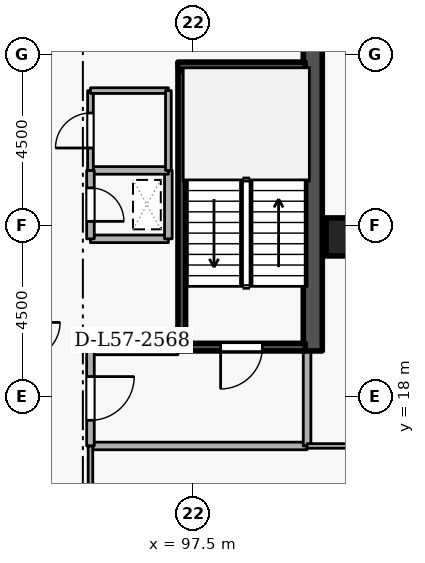
"""IFC4 building model, lengths in metres.
Left out: names, types, materials, properties, quantities, classifications, styles, units other than length and angle.
Written with IfcOpenShell. Run it as: python <this file> out.ifc"""

import sys

from ifc_helpers import new_model, si_unit, direction, frame, frame_2d, origin, origin_2d, place, context, subcontext, project, spatial, rectangle, extrude, element, fill, save


model = new_model("IFC4")
c1 = context("Model", 3, precision=1e-05, world=origin(), true_north=direction((0.0, 1.0)))
c2 = subcontext(c1, "Body", "Model", "MODEL_VIEW")
j1 = project(units=[si_unit("LENGTHUNIT", "METRE"), si_unit("PLANEANGLEUNIT", "RADIAN")], contexts=[c1])
p1 = place(None, origin())
s1 = spatial("IfcSite", under=j1, at=p1, CompositionType="ELEMENT")
p2 = place(p1, origin())
s2 = spatial("IfcBuilding", under=s1, at=p2, CompositionType="ELEMENT")
p3 = place(p2, frame((0.0, 0.0, 214.5)))
s3 = spatial("IfcBuildingStorey", under=s2, at=p3, CompositionType="ELEMENT", Elevation=214.5)
p4 = place(p3, frame((100.65, 19.2, 0.0), z_axis=(0.0, 0.0, 1.0), x_axis=(0.0, 1.0, 0.0)))
e1 = element("IfcWall", 1, at=p4, inside=s3, PredefinedType="SHEAR", context=c2, shape_type="SweptSolid", body=[
    extrude(rectangle(XDim=15.6, YDim=0.5, at=frame_2d((7.8, 0.0))), origin(), (0.0, 0.0, 1.0), 3.6),
])
p5 = place(p3, frame((101.5, 22.2, 0.0), z_axis=(0.0, 0.0, 1.0), x_axis=(1.0, 0.0, 0.0)))
e2 = element("IfcColumn", 2, at=p5, inside=s3, PredefinedType="COLUMN", context=c2, shape_type="SweptSolid", body=[
    extrude(rectangle(XDim=1.0, YDim=1.0, at=origin_2d()), origin(), (0.0, 0.0, 1.0), 3.6),
])
p6 = place(p3, frame((100.45, 19.3, 0.0), z_axis=(0.0, 0.0, 1.0), x_axis=(-1.0, 0.0, 0.0)))
e3 = element("IfcWall", 3, at=p6, inside=s3, PredefinedType="SHEAR", context=c2, shape_type="SweptSolid", body=[
    extrude(rectangle(XDim=3.35, YDim=0.2, at=frame_2d((1.675, 0.0))), origin(), (0.0, 0.0, 1.0), 3.6),
])
p7 = place(p6, frame((1.125, 0.0, 0.0)))
e4 = element("IfcOpeningElement", 4, at=p7, cuts=e3, PredefinedType="OPENING", context=c2, shape_type="SweptSolid", body=[
    extrude(rectangle(XDim=1.1, YDim=2.1, at=frame_2d((0.55, 1.05))), frame((0.0, 0.11, 0.0), z_axis=(0.0, -1.0, 0.0), x_axis=(1.0, 0.0, 0.0)), (0.0, 0.0, 1.0), 0.22),
])
p8 = place(p3, frame((97.1, 26.7, 0.0), z_axis=(0.0, 0.0, 1.0), x_axis=(1.0, 0.0, 0.0)))
e5 = element("IfcWall", 5, at=p8, inside=s3, PredefinedType="SHEAR", context=c2, shape_type="SweptSolid", body=[
    extrude(rectangle(XDim=3.35, YDim=0.2, at=frame_2d((1.675, 0.0))), origin(), (0.0, 0.0, 1.0), 3.6),
])
p9 = place(p3, frame((97.203, 26.55, 0.0), z_axis=(0.0, 0.0, 1.0), x_axis=(0.0, -1.0, 0.0)))
e6 = element("IfcWall", 6, at=p9, inside=s3, PredefinedType="SHEAR", context=c2, shape_type="SweptSolid", body=[
    extrude(rectangle(XDim=7.1, YDim=0.2, at=frame_2d((3.55, 0.0))), origin(), (0.0, 0.0, 1.0), 3.6),
])
p10 = place(p3, frame((94.8, 16.7, 0.0), z_axis=(0.0, 0.0, 1.0), x_axis=(1.0, 0.0, 0.0)))
e7 = element("IfcWall", 7, at=p10, inside=s3, PredefinedType="STANDARD", context=c2, shape_type="SweptSolid", body=[
    extrude(rectangle(XDim=5.7, YDim=0.2, at=frame_2d((2.85, 0.0))), origin(), (0.0, 0.0, 1.0), 3.34),
])
p11 = place(p3, frame((100.5, 16.7, 0.0), z_axis=(0.0, 0.0, 1.0), x_axis=(0.0, 1.0, 0.0)))
e8 = element("IfcWall", 8, at=p11, inside=s3, PredefinedType="STANDARD", context=c2, shape_type="SweptSolid", body=[
    extrude(rectangle(XDim=2.5, YDim=0.2, at=frame_2d((1.25, 0.0))), origin(), (0.0, 0.0, 1.0), 3.34),
])
p12 = place(p3, frame((97.1, 19.2, 0.0), z_axis=(0.0, 0.0, 1.0), x_axis=(-1.0, 0.0, 0.0)))
e9 = element("IfcWall", 9, at=p12, inside=s3, PredefinedType="STANDARD", context=c2, shape_type="SweptSolid", body=[
    extrude(rectangle(XDim=2.3, YDim=0.2, at=frame_2d((1.15, 0.0))), origin(), (0.0, 0.0, 1.0), 2.545),
])
p13 = place(p3, frame((94.8, 19.2, 0.0), z_axis=(0.0, 0.0, 1.0), x_axis=(0.0, -1.0, 0.0)))
e10 = element("IfcWall", 10, at=p13, inside=s3, PredefinedType="STANDARD", context=c2, shape_type="SweptSolid", body=[
    extrude(rectangle(XDim=2.5, YDim=0.2, at=frame_2d((1.25, 0.0))), origin(), (0.0, 0.0, 1.0), 3.34),
])
p14 = place(p13, frame((0.675, 0.0, 0.0)))
e11 = element("IfcOpeningElement", 11, at=p14, cuts=e10, PredefinedType="OPENING", context=c2, shape_type="SweptSolid", body=[
    extrude(rectangle(XDim=1.15, YDim=2.1, at=frame_2d((0.575, 1.05))), frame((0.0, 0.11, 0.0), z_axis=(0.0, -1.0, 0.0), x_axis=(1.0, 0.0, 0.0)), (0.0, 0.0, 1.0), 0.22),
])
p15 = place(p3, frame((94.8, 22.15, 0.0), z_axis=(0.0, 0.0, 1.0), x_axis=(1.0, 0.0, 0.0)))
e12 = element("IfcWall", 12, at=p15, inside=s3, PredefinedType="STANDARD", context=c2, shape_type="SweptSolid", body=[
    extrude(rectangle(XDim=2.05, YDim=0.2, at=frame_2d((1.025, 0.0))), origin(), (0.0, 0.0, 1.0), 3.34),
])
p16 = place(p3, frame((96.85, 22.15, 0.0), z_axis=(0.0, 0.0, 1.0), x_axis=(0.0, 1.0, 0.0)))
e13 = element("IfcWall", 13, at=p16, inside=s3, PredefinedType="STANDARD", context=c2, shape_type="SweptSolid", body=[
    extrude(rectangle(XDim=1.8, YDim=0.2, at=frame_2d((0.9, 0.0))), origin(), (0.0, 0.0, 1.0), 3.34),
])
p17 = place(p3, frame((96.85, 23.95, 0.0), z_axis=(0.0, 0.0, 1.0), x_axis=(-1.0, 0.0, 0.0)))
e14 = element("IfcWall", 14, at=p17, inside=s3, PredefinedType="STANDARD", context=c2, shape_type="SweptSolid", body=[
    extrude(rectangle(XDim=2.05, YDim=0.2, at=frame_2d((1.025, 0.0))), origin(), (0.0, 0.0, 1.0), 3.34),
])
p18 = place(p3, frame((94.8, 23.95, 0.0), z_axis=(0.0, 0.0, 1.0), x_axis=(0.0, -1.0, 0.0)))
e15 = element("IfcWall", 15, at=p18, inside=s3, PredefinedType="STANDARD", context=c2, shape_type="SweptSolid", body=[
    extrude(rectangle(XDim=1.8, YDim=0.2, at=frame_2d((0.9, 0.0))), origin(), (0.0, 0.0, 1.0), 3.34),
])
p19 = place(p18, frame((0.46, 0.0, 0.0)))
e16 = element("IfcOpeningElement", 16, at=p19, cuts=e15, PredefinedType="OPENING", context=c2, shape_type="SweptSolid", body=[
    extrude(rectangle(XDim=0.88, YDim=2.04, at=frame_2d((0.44, 1.02))), frame((0.0, 0.11, 0.0), z_axis=(0.0, -1.0, 0.0), x_axis=(1.0, 0.0, 0.0)), (0.0, 0.0, 1.0), 0.22),
])
p20 = place(p3, frame((94.8, 23.95, 0.0), z_axis=(0.0, 0.0, 1.0), x_axis=(0.0, 1.0, 0.0)))
e17 = element("IfcWall", 17, at=p20, inside=s3, PredefinedType="PARTITIONING", context=c2, shape_type="SweptSolid", body=[
    extrude(rectangle(XDim=2.1, YDim=0.15, at=frame_2d((1.05, 0.0))), origin(), (0.0, 0.0, 1.0), 3.34),
])
p21 = place(p20, frame((0.59, 0.0, 0.0)))
e18 = element("IfcOpeningElement", 18, at=p21, cuts=e17, PredefinedType="OPENING", context=c2, shape_type="SweptSolid", body=[
    extrude(rectangle(XDim=0.92, YDim=2.08, at=frame_2d((0.46, 1.04))), frame((0.0, 0.085, 0.0), z_axis=(0.0, -1.0, 0.0), x_axis=(1.0, 0.0, 0.0)), (0.0, 0.0, 1.0), 0.17),
])
p22 = place(p3, frame((94.8, 26.05, 0.0), z_axis=(0.0, 0.0, 1.0), x_axis=(1.0, 0.0, 0.0)))
e19 = element("IfcWall", 19, at=p22, inside=s3, PredefinedType="PARTITIONING", context=c2, shape_type="SweptSolid", body=[
    extrude(rectangle(XDim=2.05, YDim=0.15, at=frame_2d((1.025, 0.0))), origin(), (0.0, 0.0, 1.0), 3.34),
])
p23 = place(p3, frame((96.85, 26.05, 0.0), z_axis=(0.0, 0.0, 1.0), x_axis=(0.0, -1.0, 0.0)))
e20 = element("IfcWall", 20, at=p23, inside=s3, PredefinedType="PARTITIONING", context=c2, shape_type="SweptSolid", body=[
    extrude(rectangle(XDim=2.1, YDim=0.15, at=frame_2d((1.05, 0.0))), origin(), (0.0, 0.0, 1.0), 3.34),
])
p24 = place(p3, frame((94.8, 14.75, 0.0), z_axis=(0.0, 0.0, 1.0), x_axis=(0.0, 1.0, 0.0)))
e21 = element("IfcWall", 21, at=p24, inside=s3, PredefinedType="PARTITIONING", context=c2, shape_type="SweptSolid", body=[
    extrude(rectangle(XDim=1.95, YDim=0.12, at=frame_2d((0.975, 0.0))), origin(), (0.0, 0.0, 1.0), 3.34),
])
p25 = place(p3, frame((100.5, 16.7, 0.0), z_axis=(0.0, 0.0, 1.0), x_axis=(1.0, 0.0, 0.0)))
e22 = element("IfcWall", 22, at=p25, inside=s3, PredefinedType="PARTITIONING", context=c2, shape_type="SweptSolid", body=[
    extrude(rectangle(XDim=5.72, YDim=0.12, at=frame_2d((2.86, 0.0))), origin(), (0.0, 0.0, 1.0), 3.34),
])
p26 = place(p7, origin())
e23 = element("IfcDoor", 23, at=p26, inside=s3, OperationType="SINGLE_SWING_RIGHT", PredefinedType="DOOR", context=c2, shape_type="SweptSolid", body=[
    extrude(rectangle(XDim=1.1, YDim=2.1, at=frame_2d((0.55, 1.05))), frame((0.0, 0.025, 0.0), z_axis=(0.0, -1.0, 0.0), x_axis=(1.0, 0.0, 0.0)), (0.0, 0.0, 1.0), 0.05),
])
fill(e4, e23)
p27 = place(p14, origin())
e24 = element("IfcDoor", 24, at=p27, inside=s3, OperationType="SINGLE_SWING_LEFT", PredefinedType="DOOR", context=c2, shape_type="SweptSolid", body=[
    extrude(rectangle(XDim=1.15, YDim=2.1, at=frame_2d((0.575, 1.05))), frame((0.0, 0.025, 0.0), z_axis=(0.0, -1.0, 0.0), x_axis=(1.0, 0.0, 0.0)), (0.0, 0.0, 1.0), 0.05),
])
fill(e11, e24)
p28 = place(p19, origin())
e25 = element("IfcDoor", 25, at=p28, inside=s3, OperationType="SINGLE_SWING_RIGHT", PredefinedType="DOOR", context=c2, shape_type="SweptSolid", body=[
    extrude(rectangle(XDim=0.88, YDim=2.04, at=frame_2d((0.44, 1.02))), frame((0.0, 0.025, 0.0), z_axis=(0.0, -1.0, 0.0), x_axis=(1.0, 0.0, 0.0)), (0.0, 0.0, 1.0), 0.05),
])
fill(e16, e25)
p29 = place(p21, origin())
e26 = element("IfcDoor", 26, at=p29, inside=s3, OperationType="SINGLE_SWING_LEFT", PredefinedType="DOOR", context=c2, shape_type="SweptSolid", body=[
    extrude(rectangle(XDim=0.92, YDim=2.08, at=frame_2d((0.46, 1.04))), frame((0.0, 0.025, 0.0), z_axis=(0.0, -1.0, 0.0), x_axis=(1.0, 0.0, 0.0)), (0.0, 0.0, 1.0), 0.05),
])
fill(e18, e26)
save(model, sys.argv[1])
